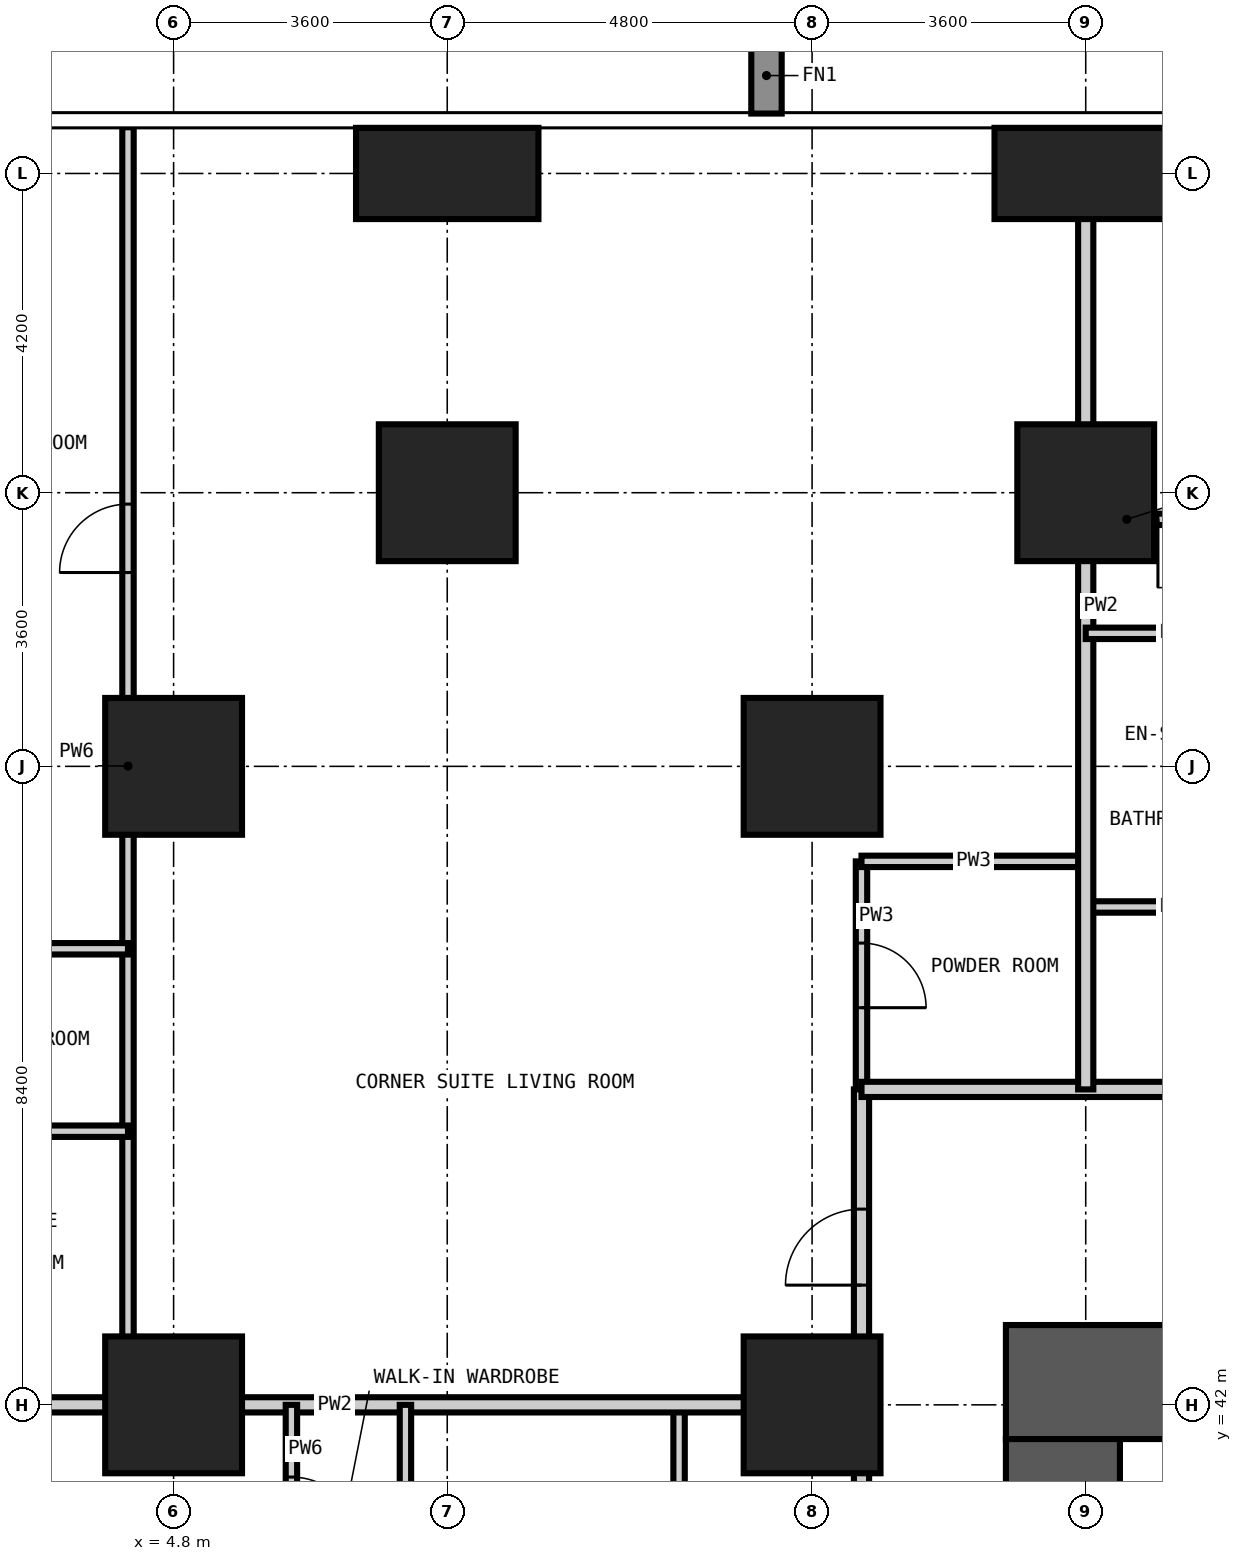
"""IFC4 building model, lengths in metres.
Left out: names, types, materials, properties, quantities, classifications, styles, units other than length and angle.
Written with IfcOpenShell. Run it as: python <this file> out.ifc"""

import sys

from ifc_helpers import new_model, si_unit, direction, frame, frame_2d, origin, origin_2d, place, context, subcontext, project, spatial, rectangle, extrude, element, fill, save


model = new_model("IFC4")
c1 = context("Model", 3, precision=1e-05, world=origin(), true_north=direction((0.0, 1.0)))
c2 = subcontext(c1, "Body", "Model", "MODEL_VIEW")
j1 = project(units=[si_unit("LENGTHUNIT", "METRE"), si_unit("PLANEANGLEUNIT", "RADIAN")], contexts=[c1])
p1 = place(None, origin())
s1 = spatial("IfcSite", under=j1, at=p1, CompositionType="ELEMENT")
p2 = place(p1, origin())
s2 = spatial("IfcBuilding", under=s1, at=p2, CompositionType="ELEMENT")
p3 = place(p2, frame((0.0, 0.0, 55.8)))
s3 = spatial("IfcBuildingStorey", under=s2, at=p3, CompositionType="ELEMENT", Elevation=55.8)
for number, where, z_axis, x_axis in (
    (1, (4.8, 42.0, -0.35), (0.0, 0.0, 1.0), (1.0, 0.0, 0.0)),
    (2, (4.8, 50.4, -0.35), (0.0, 0.0, 1.0), (1.0, 0.0, 0.0)),
    (3, (8.4, 54.0, -0.35), (0.0, 0.0, 1.0), (1.0, 0.0, 0.0)),
):
    element("IfcColumn", number, at=place(p3, frame(where, z_axis=z_axis, x_axis=x_axis)), inside=s3, PredefinedType="COLUMN", context=c2, shape_type="SweptSolid", body=[
        extrude(rectangle(XDim=1.8, YDim=1.8, at=origin_2d()), origin(), (0.0, 0.0, 1.0), 3.6),
    ])
p4 = place(p3, frame((8.4, 58.2, -0.35), z_axis=(0.0, 0.0, 1.0), x_axis=(1.0, 0.0, 0.0)))
e4 = element("IfcColumn", 4, at=p4, inside=s3, PredefinedType="COLUMN", context=c2, shape_type="SweptSolid", body=[
    extrude(rectangle(XDim=2.4, YDim=1.2, at=origin_2d()), origin(), (0.0, 0.0, 1.0), 3.6),
])
for number, where, z_axis, x_axis in (
    (5, (13.2, 42.0, -0.35), (0.0, 0.0, 1.0), (1.0, 0.0, 0.0)),
    (6, (13.2, 50.4, -0.35), (0.0, 0.0, 1.0), (1.0, 0.0, 0.0)),
    (7, (16.8, 54.0, -0.35), (0.0, 0.0, 1.0), (1.0, 0.0, 0.0)),
):
    element("IfcColumn", number, at=place(p3, frame(where, z_axis=z_axis, x_axis=x_axis)), inside=s3, PredefinedType="COLUMN", context=c2, shape_type="SweptSolid", body=[
        extrude(rectangle(XDim=1.8, YDim=1.8, at=origin_2d()), origin(), (0.0, 0.0, 1.0), 3.6),
    ])
p5 = place(p3, frame((16.8, 58.2, -0.35), z_axis=(0.0, 0.0, 1.0), x_axis=(1.0, 0.0, 0.0)))
e8 = element("IfcColumn", 8, at=p5, inside=s3, PredefinedType="COLUMN", context=c2, shape_type="SweptSolid", body=[
    extrude(rectangle(XDim=2.4, YDim=1.2, at=origin_2d()), origin(), (0.0, 0.0, 1.0), 3.6),
])
p6 = place(p3, frame((43.05, 42.3, -0.35), z_axis=(0.0, 0.0, 1.0), x_axis=(-1.0, 0.0, 0.0)))
e9 = element("IfcWall", 9, at=p6, inside=s3, PredefinedType="SHEAR", context=c2, shape_type="SweptSolid", body=[
    extrude(rectangle(XDim=27.3, YDim=1.5, at=frame_2d((13.65, 0.0))), origin(), (0.0, 0.0, 1.0), 3.6),
])
p7 = place(p6, frame((21.55, 0.0, 0.35)))
e10 = element("IfcOpeningElement", 10, at=p7, cuts=e9, PredefinedType="OPENING", context=c2, shape_type="SweptSolid", body=[
    extrude(rectangle(XDim=1.0, YDim=2.1, at=frame_2d((0.5, 1.05))), frame((0.0, 0.76, 0.0), z_axis=(0.0, -1.0, 0.0), x_axis=(1.0, 0.0, 0.0)), (0.0, 0.0, 1.0), 1.52),
])
p8 = place(p6, frame((10.95, 0.0, 0.35)))
e11 = element("IfcOpeningElement", 11, at=p8, cuts=e9, PredefinedType="OPENING", context=c2, shape_type="SweptSolid", body=[
    extrude(rectangle(XDim=1.2, YDim=2.2, at=frame_2d((0.6, 1.1))), frame((0.0, 0.76, 0.0), z_axis=(0.0, -1.0, 0.0), x_axis=(1.0, 0.0, 0.0)), (0.0, 0.0, 1.0), 1.52),
])
p9 = place(p3, frame((16.5, 41.55, -0.35), z_axis=(0.0, 0.0, 1.0), x_axis=(0.0, -1.0, 0.0)))
e12 = element("IfcWall", 12, at=p9, inside=s3, PredefinedType="SHEAR", context=c2, shape_type="SweptSolid", body=[
    extrude(rectangle(XDim=24.3, YDim=1.5, at=frame_2d((12.15, 0.0))), origin(), (0.0, 0.0, 1.0), 3.6),
])
p10 = place(p9, frame((11.25, 0.0, 0.35)))
e13 = element("IfcOpeningElement", 13, at=p10, cuts=e12, PredefinedType="OPENING", context=c2, shape_type="SweptSolid", body=[
    extrude(rectangle(XDim=1.8, YDim=2.2, at=frame_2d((0.9, 1.1))), frame((0.0, 0.76, 0.0), z_axis=(0.0, -1.0, 0.0), x_axis=(1.0, 0.0, 0.0)), (0.0, 0.0, 1.0), 1.52),
])
p11 = place(p9, frame((20.05, 0.0, 0.35)))
e14 = element("IfcOpeningElement", 14, at=p11, cuts=e12, PredefinedType="OPENING", context=c2, shape_type="SweptSolid", body=[
    extrude(rectangle(XDim=1.0, YDim=2.1, at=frame_2d((0.5, 1.05))), frame((0.0, 0.76, 0.0), z_axis=(0.0, -1.0, 0.0), x_axis=(1.0, 0.0, 0.0)), (0.0, 0.0, 1.0), 1.52),
])
p12 = place(p9, frame((5.35, 0.0, 0.35)))
e15 = element("IfcOpeningElement", 15, at=p12, cuts=e12, PredefinedType="OPENING", context=c2, shape_type="SweptSolid", body=[
    extrude(rectangle(XDim=1.0, YDim=2.1, at=frame_2d((0.5, 1.05))), frame((0.0, 0.76, 0.0), z_axis=(0.0, -1.0, 0.0), x_axis=(1.0, 0.0, 0.0)), (0.0, 0.0, 1.0), 1.52),
])
p13 = place(p3, frame((11.45, 39.6, 0.0), z_axis=(0.0, 0.0, 1.0), x_axis=(0.0, 1.0, 0.0)))
e16 = element("IfcWall", 16, at=p13, inside=s3, PredefinedType="PARTITIONING", context=c2, shape_type="SweptSolid", body=[
    extrude(rectangle(XDim=2.4, YDim=0.15, at=frame_2d((1.2, 0.0))), origin(), (0.0, 0.0, 1.0), 3.25),
])
p14 = place(p3, frame((13.85, 46.15, 0.0), z_axis=(0.0, 0.0, 1.0), x_axis=(0.0, 1.0, 0.0)))
e17 = element("IfcWall", 17, at=p14, inside=s3, PredefinedType="PARTITIONING", context=c2, shape_type="SweptSolid", body=[
    extrude(rectangle(XDim=3.0, YDim=0.15, at=frame_2d((1.5, 0.0))), origin(), (0.0, 0.0, 1.0), 3.25),
])
p15 = place(p14, frame((1.075, 0.0, 0.0)))
e18 = element("IfcOpeningElement", 18, at=p15, cuts=e17, PredefinedType="OPENING", context=c2, shape_type="SweptSolid", body=[
    extrude(rectangle(XDim=0.85, YDim=2.1, at=frame_2d((0.425, 1.05))), frame((0.0, 0.085, 0.0), z_axis=(0.0, -1.0, 0.0), x_axis=(1.0, 0.0, 0.0)), (0.0, 0.0, 1.0), 0.17),
])
p16 = place(p3, frame((16.8, 48.55, 0.0), z_axis=(0.0, 0.0, 1.0), x_axis=(1.0, 0.0, 0.0)))
e19 = element("IfcWall", 19, at=p16, inside=s3, PredefinedType="PARTITIONING", context=c2, shape_type="SweptSolid", body=[
    extrude(rectangle(XDim=2.4, YDim=0.15, at=frame_2d((1.2, 0.0))), origin(), (0.0, 0.0, 1.0), 3.25),
])
p17 = place(p3, frame((13.85, 49.15, 0.0), z_axis=(0.0, 0.0, 1.0), x_axis=(1.0, 0.0, 0.0)))
e20 = element("IfcWall", 20, at=p17, inside=s3, PredefinedType="PARTITIONING", context=c2, shape_type="SweptSolid", body=[
    extrude(rectangle(XDim=2.95, YDim=0.15, at=frame_2d((1.475, 0.0))), origin(), (0.0, 0.0, 1.0), 3.25),
])
p18 = place(p3, frame((13.85, 13.85, 0.0), z_axis=(0.0, 0.0, 1.0), x_axis=(0.0, 1.0, 0.0)))
e21 = element("IfcWall", 21, at=p18, inside=s3, PredefinedType="PARTITIONING", context=c2, shape_type="SweptSolid", body=[
    extrude(rectangle(XDim=32.3, YDim=0.2, at=frame_2d((16.15, 0.0))), origin(), (0.0, 0.0, 1.0), 3.25),
])
p19 = place(p18, frame((5.45, 0.0, 0.0)))
e22 = element("IfcOpeningElement", 22, at=p19, cuts=e21, PredefinedType="OPENING", context=c2, shape_type="SweptSolid", body=[
    extrude(rectangle(XDim=1.0, YDim=2.2, at=frame_2d((0.5, 1.1))), frame((0.0, 0.11, 0.0), z_axis=(0.0, -1.0, 0.0), x_axis=(1.0, 0.0, 0.0)), (0.0, 0.0, 1.0), 0.22),
])
p20 = place(p18, frame((13.85, 0.0, 0.0)))
e23 = element("IfcOpeningElement", 23, at=p20, cuts=e21, PredefinedType="OPENING", context=c2, shape_type="SweptSolid", body=[
    extrude(rectangle(XDim=1.0, YDim=2.2, at=frame_2d((0.5, 1.1))), frame((0.0, 0.11, 0.0), z_axis=(0.0, -1.0, 0.0), x_axis=(1.0, 0.0, 0.0)), (0.0, 0.0, 1.0), 0.22),
])
p21 = place(p18, frame((22.25, 0.0, 0.0)))
e24 = element("IfcOpeningElement", 24, at=p21, cuts=e21, PredefinedType="OPENING", context=c2, shape_type="SweptSolid", body=[
    extrude(rectangle(XDim=1.0, YDim=2.2, at=frame_2d((0.5, 1.1))), frame((0.0, 0.11, 0.0), z_axis=(0.0, -1.0, 0.0), x_axis=(1.0, 0.0, 0.0)), (0.0, 0.0, 1.0), 0.22),
])
p22 = place(p18, frame((0.975, 0.0, 0.0)))
e25 = element("IfcOpeningElement", 25, at=p22, cuts=e21, PredefinedType="OPENING", context=c2, shape_type="SweptSolid", body=[
    extrude(rectangle(XDim=1.0, YDim=2.2, at=frame_2d((0.5, 1.1))), frame((0.0, 0.11, 0.0), z_axis=(0.0, -1.0, 0.0), x_axis=(1.0, 0.0, 0.0)), (0.0, 0.0, 1.0), 0.22),
])
p23 = place(p18, frame((29.725, 0.0, 0.0)))
e26 = element("IfcOpeningElement", 26, at=p23, cuts=e21, PredefinedType="OPENING", context=c2, shape_type="SweptSolid", body=[
    extrude(rectangle(XDim=1.0, YDim=2.2, at=frame_2d((0.5, 1.1))), frame((0.0, 0.11, 0.0), z_axis=(0.0, -1.0, 0.0), x_axis=(1.0, 0.0, 0.0)), (0.0, 0.0, 1.0), 0.22),
])
p24 = place(p3, frame((13.85, 46.15, 0.0), z_axis=(0.0, 0.0, 1.0), x_axis=(1.0, 0.0, 0.0)))
e27 = element("IfcWall", 27, at=p24, inside=s3, PredefinedType="PARTITIONING", context=c2, shape_type="SweptSolid", body=[
    extrude(rectangle(XDim=31.7, YDim=0.2, at=frame_2d((15.85, 0.0))), origin(), (0.0, 0.0, 1.0), 3.25),
])
p25 = place(p24, frame((6.65, 0.0, 0.0)))
e28 = element("IfcOpeningElement", 28, at=p25, cuts=e27, PredefinedType="OPENING", context=c2, shape_type="SweptSolid", body=[
    extrude(rectangle(XDim=1.0, YDim=2.2, at=frame_2d((0.5, 1.1))), frame((0.0, 0.11, 0.0), z_axis=(0.0, -1.0, 0.0), x_axis=(1.0, 0.0, 0.0)), (0.0, 0.0, 1.0), 0.22),
])
p26 = place(p24, frame((15.05, 0.0, 0.0)))
e29 = element("IfcOpeningElement", 29, at=p26, cuts=e27, PredefinedType="OPENING", context=c2, shape_type="SweptSolid", body=[
    extrude(rectangle(XDim=1.0, YDim=2.2, at=frame_2d((0.5, 1.1))), frame((0.0, 0.11, 0.0), z_axis=(0.0, -1.0, 0.0), x_axis=(1.0, 0.0, 0.0)), (0.0, 0.0, 1.0), 0.22),
])
p27 = place(p24, frame((23.45, 0.0, 0.0)))
e30 = element("IfcOpeningElement", 30, at=p27, cuts=e27, PredefinedType="OPENING", context=c2, shape_type="SweptSolid", body=[
    extrude(rectangle(XDim=1.0, YDim=2.2, at=frame_2d((0.5, 1.1))), frame((0.0, 0.11, 0.0), z_axis=(0.0, -1.0, 0.0), x_axis=(1.0, 0.0, 0.0)), (0.0, 0.0, 1.0), 0.22),
])
p28 = place(p3, frame((16.8, 46.15, 0.0), z_axis=(0.0, 0.0, 1.0), x_axis=(0.0, 1.0, 0.0)))
e31 = element("IfcWall", 31, at=p28, inside=s3, PredefinedType="PARTITIONING", context=c2, shape_type="SweptSolid", body=[
    extrude(rectangle(XDim=12.658, YDim=0.2, at=frame_2d((6.329, 0.0))), origin(), (0.0, 0.0, 1.0), 3.25),
])
p29 = place(p3, frame((-0.008, 42.0, 0.0), z_axis=(0.0, 0.0, 1.0), x_axis=(1.0, 0.0, 0.0)))
e32 = element("IfcWall", 32, at=p29, inside=s3, PredefinedType="PARTITIONING", context=c2, shape_type="SweptSolid", body=[
    extrude(rectangle(XDim=13.858, YDim=0.2, at=frame_2d((6.929, 0.0))), origin(), (0.0, 0.0, 1.0), 3.25),
])
p30 = place(p3, frame((4.2, 42.0, 0.0), z_axis=(0.0, 0.0, 1.0), x_axis=(0.0, 1.0, 0.0)))
e33 = element("IfcWall", 33, at=p30, inside=s3, PredefinedType="PARTITIONING", context=c2, shape_type="SweptSolid", body=[
    extrude(rectangle(XDim=16.808, YDim=0.15, at=frame_2d((8.404, 0.0))), origin(), (0.0, 0.0, 1.0), 3.25),
])
p31 = place(p30, frame((10.95, 0.0, 0.0)))
e34 = element("IfcOpeningElement", 34, at=p31, cuts=e33, PredefinedType="OPENING", context=c2, shape_type="SweptSolid", body=[
    extrude(rectangle(XDim=0.9, YDim=2.1, at=frame_2d((0.45, 1.05))), frame((0.0, 0.085, 0.0), z_axis=(0.0, -1.0, 0.0), x_axis=(1.0, 0.0, 0.0)), (0.0, 0.0, 1.0), 0.17),
])
p32 = place(p3, frame((6.35, 39.6, 0.0), z_axis=(0.0, 0.0, 1.0), x_axis=(0.0, 1.0, 0.0)))
e35 = element("IfcWall", 35, at=p32, inside=s3, PredefinedType="PARTITIONING", context=c2, shape_type="SweptSolid", body=[
    extrude(rectangle(XDim=2.4, YDim=0.15, at=frame_2d((1.2, 0.0))), origin(), (0.0, 0.0, 1.0), 3.25),
])
p33 = place(p32, frame((0.55, 0.0, 0.0)))
e36 = element("IfcOpeningElement", 36, at=p33, cuts=e35, PredefinedType="OPENING", context=c2, shape_type="SweptSolid", body=[
    extrude(rectangle(XDim=0.9, YDim=2.1, at=frame_2d((0.45, 1.05))), frame((0.0, 0.085, 0.0), z_axis=(0.0, -1.0, 0.0), x_axis=(1.0, 0.0, 0.0)), (0.0, 0.0, 1.0), 0.17),
])
p34 = place(p3, frame((7.85, 39.6, 0.0), z_axis=(0.0, 0.0, 1.0), x_axis=(0.0, 1.0, 0.0)))
e37 = element("IfcWall", 37, at=p34, inside=s3, PredefinedType="PARTITIONING", context=c2, shape_type="SweptSolid", body=[
    extrude(rectangle(XDim=2.4, YDim=0.15, at=frame_2d((1.2, 0.0))), origin(), (0.0, 0.0, 1.0), 3.25),
])
p35 = place(p3, frame((1.2, 45.6, 0.0), z_axis=(0.0, 0.0, 1.0), x_axis=(1.0, 0.0, 0.0)))
e38 = element("IfcWall", 38, at=p35, inside=s3, PredefinedType="PARTITIONING", context=c2, shape_type="SweptSolid", body=[
    extrude(rectangle(XDim=3.0, YDim=0.15, at=frame_2d((1.5, 0.0))), origin(), (0.0, 0.0, 1.0), 3.25),
])
p36 = place(p3, frame((1.2, 48.0, 0.0), z_axis=(0.0, 0.0, 1.0), x_axis=(1.0, 0.0, 0.0)))
e39 = element("IfcWall", 39, at=p36, inside=s3, PredefinedType="PARTITIONING", context=c2, shape_type="SweptSolid", body=[
    extrude(rectangle(XDim=3.0, YDim=0.15, at=frame_2d((1.5, 0.0))), origin(), (0.0, 0.0, 1.0), 3.25),
])
p37 = place(p36, frame((1.05, 0.0, 0.0)))
e40 = element("IfcOpeningElement", 40, at=p37, cuts=e39, PredefinedType="OPENING", context=c2, shape_type="SweptSolid", body=[
    extrude(rectangle(XDim=0.9, YDim=2.1, at=frame_2d((0.45, 1.05))), frame((0.0, 0.085, 0.0), z_axis=(0.0, -1.0, 0.0), x_axis=(1.0, 0.0, 0.0)), (0.0, 0.0, 1.0), 0.17),
])
p38 = place(p3, frame((16.8, 52.15, 0.0), z_axis=(0.0, 0.0, 1.0), x_axis=(1.0, 0.0, 0.0)))
e41 = element("IfcWall", 41, at=p38, inside=s3, PredefinedType="PARTITIONING", context=c2, shape_type="SweptSolid", body=[
    extrude(rectangle(XDim=2.4, YDim=0.15, at=frame_2d((1.2, 0.0))), origin(), (0.0, 0.0, 1.0), 3.25),
])
p39 = place(p3, frame((16.8, 53.65, 0.0), z_axis=(0.0, 0.0, 1.0), x_axis=(1.0, 0.0, 0.0)))
e42 = element("IfcWall", 42, at=p39, inside=s3, PredefinedType="PARTITIONING", context=c2, shape_type="SweptSolid", body=[
    extrude(rectangle(XDim=2.4, YDim=0.15, at=frame_2d((1.2, 0.0))), origin(), (0.0, 0.0, 1.0), 3.25),
])
p40 = place(p39, frame((0.95, 0.0, 0.0)))
e43 = element("IfcOpeningElement", 43, at=p40, cuts=e42, PredefinedType="OPENING", context=c2, shape_type="SweptSolid", body=[
    extrude(rectangle(XDim=0.9, YDim=2.1, at=frame_2d((0.45, 1.05))), frame((0.0, 0.085, 0.0), z_axis=(0.0, -1.0, 0.0), x_axis=(1.0, 0.0, 0.0)), (0.0, 0.0, 1.0), 0.17),
])
p41 = place(p40, frame((0.9, 0.0, 0.0), z_axis=(0.0, 0.0, 1.0), x_axis=(-1.0, 0.0, 0.0)))
e44 = element("IfcDoor", 44, at=p41, inside=s3, OperationType="SINGLE_SWING_RIGHT", PredefinedType="DOOR", context=c2, shape_type="SweptSolid", body=[
    extrude(rectangle(XDim=0.9, YDim=2.1, at=frame_2d((0.45, 1.05))), frame((0.0, 0.025, 0.0), z_axis=(0.0, -1.0, 0.0), x_axis=(1.0, 0.0, 0.0)), (0.0, 0.0, 1.0), 0.05),
])
fill(e43, e44)
p42 = place(p33, frame((0.9, 0.0, 0.0), z_axis=(0.0, 0.0, 1.0), x_axis=(-1.0, 0.0, 0.0)))
e45 = element("IfcDoor", 45, at=p42, inside=s3, OperationType="SINGLE_SWING_RIGHT", PredefinedType="DOOR", context=c2, shape_type="SweptSolid", body=[
    extrude(rectangle(XDim=0.9, YDim=2.1, at=frame_2d((0.45, 1.05))), frame((0.0, 0.025, 0.0), z_axis=(0.0, -1.0, 0.0), x_axis=(1.0, 0.0, 0.0)), (0.0, 0.0, 1.0), 0.05),
])
fill(e36, e45)
p43 = place(p23, origin())
e46 = element("IfcDoor", 46, at=p43, inside=s3, OperationType="SINGLE_SWING_LEFT", PredefinedType="DOOR", context=c2, shape_type="SweptSolid", body=[
    extrude(rectangle(XDim=1.0, YDim=2.2, at=frame_2d((0.5, 1.1))), frame((0.0, 0.025, 0.0), z_axis=(0.0, -1.0, 0.0), x_axis=(1.0, 0.0, 0.0)), (0.0, 0.0, 1.0), 0.05),
])
fill(e26, e46)
p44 = place(p15, frame((0.85, 0.0, 0.0), z_axis=(0.0, 0.0, 1.0), x_axis=(-1.0, 0.0, 0.0)))
e47 = element("IfcDoor", 47, at=p44, inside=s3, OperationType="SINGLE_SWING_RIGHT", PredefinedType="DOOR", context=c2, shape_type="SweptSolid", body=[
    extrude(rectangle(XDim=0.85, YDim=2.1, at=frame_2d((0.425, 1.05))), frame((0.0, 0.025, 0.0), z_axis=(0.0, -1.0, 0.0), x_axis=(1.0, 0.0, 0.0)), (0.0, 0.0, 1.0), 0.05),
])
fill(e18, e47)
p45 = place(p31, origin())
e48 = element("IfcDoor", 48, at=p45, inside=s3, OperationType="SINGLE_SWING_LEFT", PredefinedType="DOOR", context=c2, shape_type="SweptSolid", body=[
    extrude(rectangle(XDim=0.9, YDim=2.1, at=frame_2d((0.45, 1.05))), frame((0.0, 0.025, 0.0), z_axis=(0.0, -1.0, 0.0), x_axis=(1.0, 0.0, 0.0)), (0.0, 0.0, 1.0), 0.05),
])
fill(e34, e48)
save(model, sys.argv[1])
